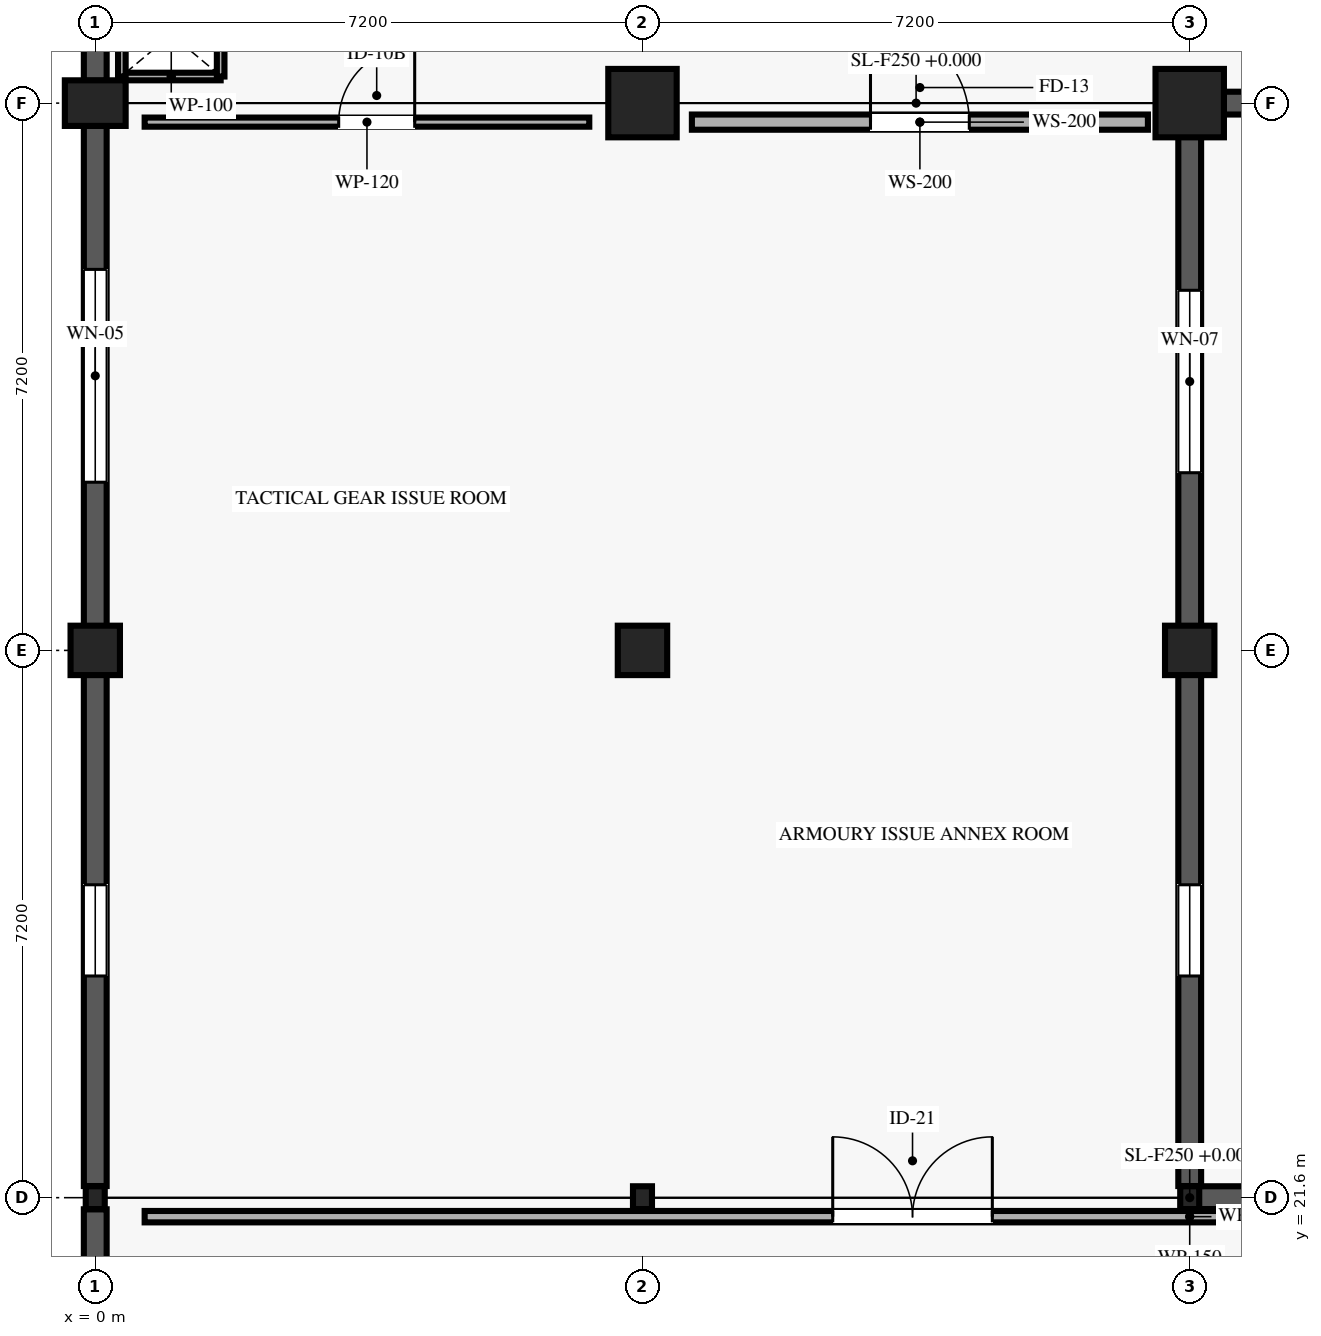
"""IFC4 building model, lengths in metres.
Left out: names, types, materials, properties, quantities, classifications, styles, units other than length and angle.
Written with IfcOpenShell. Run it as: python <this file> out.ifc"""

import sys

from ifc_helpers import new_model, si_unit, direction, frame, frame_2d, origin, origin_2d, place, context, subcontext, project, spatial, rectangle, i_section, extrude, element, fill, save


model = new_model("IFC4")
c1 = context("Model", 3, precision=1e-05, world=origin(), true_north=direction((0.0, 1.0)))
c2 = subcontext(c1, "Body", "Model", "MODEL_VIEW")
j1 = project(units=[si_unit("LENGTHUNIT", "METRE"), si_unit("PLANEANGLEUNIT", "RADIAN")], contexts=[c1])
p1 = place(None, origin())
s1 = spatial("IfcSite", under=j1, at=p1, CompositionType="ELEMENT")
p2 = place(p1, origin())
s2 = spatial("IfcBuilding", under=s1, at=p2, CompositionType="ELEMENT")
p3 = place(p2, origin())
s3 = spatial("IfcBuildingStorey", under=s2, at=p3, CompositionType="ELEMENT", Elevation=0.0)
p4 = place(p3, frame((0.0, 21.6, 0.0), z_axis=(0.0, 0.0, 1.0), x_axis=(1.0, 0.0, 0.0)))
e1 = element("IfcColumn", 1, at=p4, inside=s3, PredefinedType="COLUMN", context=c2, shape_type="SweptSolid", body=[
    extrude(i_section(OverallWidth=0.25, OverallDepth=0.3, WebThickness=0.01, FlangeThickness=0.01, at=origin_2d()), origin(), (0.0, 0.0, 1.0), 5.4),
])
p5 = place(p3, frame((0.0, 28.8, 0.0), z_axis=(0.0, 0.0, 1.0), x_axis=(1.0, 0.0, 0.0)))
e2 = element("IfcColumn", 2, at=p5, inside=s3, PredefinedType="COLUMN", context=c2, shape_type="SweptSolid", body=[
    extrude(rectangle(XDim=0.65, YDim=0.65, at=origin_2d()), origin(), (0.0, 0.0, 1.0), 5.4),
])
p6 = place(p3, frame((0.0, 36.0, 0.0), z_axis=(0.0, 0.0, 1.0), x_axis=(0.0, 1.0, 0.0)))
e3 = element("IfcColumn", 3, at=p6, inside=s3, PredefinedType="COLUMN", context=c2, shape_type="SweptSolid", body=[
    extrude(rectangle(XDim=0.6, YDim=0.8, at=origin_2d()), origin(), (0.0, 0.0, 1.0), 5.4),
])
p7 = place(p3, frame((7.2, 21.6, 0.0), z_axis=(0.0, 0.0, 1.0), x_axis=(1.0, 0.0, 0.0)))
e4 = element("IfcColumn", 4, at=p7, inside=s3, PredefinedType="COLUMN", context=c2, shape_type="SweptSolid", body=[
    extrude(i_section(OverallWidth=0.25, OverallDepth=0.3, WebThickness=0.01, FlangeThickness=0.01, at=origin_2d()), origin(), (0.0, 0.0, 1.0), 5.4),
])
p8 = place(p3, frame((7.2, 28.8, 0.0), z_axis=(0.0, 0.0, 1.0), x_axis=(1.0, 0.0, 0.0)))
e5 = element("IfcColumn", 5, at=p8, inside=s3, PredefinedType="COLUMN", context=c2, shape_type="SweptSolid", body=[
    extrude(rectangle(XDim=0.65, YDim=0.65, at=origin_2d()), origin(), (0.0, 0.0, 1.0), 5.4),
])
p9 = place(p3, frame((7.2, 36.0, 0.0), z_axis=(0.0, 0.0, 1.0), x_axis=(1.0, 0.0, 0.0)))
e6 = element("IfcColumn", 6, at=p9, inside=s3, PredefinedType="COLUMN", context=c2, shape_type="SweptSolid", body=[
    extrude(rectangle(XDim=0.9, YDim=0.9, at=origin_2d()), origin(), (0.0, 0.0, 1.0), 5.4),
])
p10 = place(p3, frame((14.4, 21.6, 0.0), z_axis=(0.0, 0.0, 1.0), x_axis=(1.0, 0.0, 0.0)))
e7 = element("IfcColumn", 7, at=p10, inside=s3, PredefinedType="COLUMN", context=c2, shape_type="SweptSolid", body=[
    extrude(i_section(OverallWidth=0.25, OverallDepth=0.3, WebThickness=0.01, FlangeThickness=0.01, at=origin_2d()), origin(), (0.0, 0.0, 1.0), 5.4),
])
p11 = place(p3, frame((14.4, 28.8, 0.0), z_axis=(0.0, 0.0, 1.0), x_axis=(1.0, 0.0, 0.0)))
e8 = element("IfcColumn", 8, at=p11, inside=s3, PredefinedType="COLUMN", context=c2, shape_type="SweptSolid", body=[
    extrude(rectangle(XDim=0.65, YDim=0.65, at=origin_2d()), origin(), (0.0, 0.0, 1.0), 5.4),
])
p12 = place(p3, frame((14.4, 36.0, 0.0), z_axis=(0.0, 0.0, 1.0), x_axis=(1.0, 0.0, 0.0)))
e9 = element("IfcColumn", 9, at=p12, inside=s3, PredefinedType="COLUMN", context=c2, shape_type="SweptSolid", body=[
    extrude(rectangle(XDim=0.9, YDim=0.9, at=origin_2d()), origin(), (0.0, 0.0, 1.0), 5.4),
])
p13 = place(p3, frame((14.41, 21.6, 0.0), z_axis=(0.0, 0.0, 1.0), x_axis=(1.0, 0.0, 0.0)))
e10 = element("IfcWall", 10, at=p13, inside=s3, PredefinedType="SOLIDWALL", context=c2, shape_type="SweptSolid", body=[
    extrude(rectangle(XDim=7.18, YDim=0.3, at=frame_2d((3.59, 0.0))), origin(), (0.0, 0.0, 1.0), 5.16),
])
p14 = place(p13, frame((2.99, 0.0, 1.85)))
e11 = element("IfcOpeningElement", 11, at=p14, cuts=e10, PredefinedType="OPENING", context=c2, shape_type="SweptSolid", body=[
    extrude(rectangle(XDim=1.2, YDim=0.65, at=frame_2d((0.6, 0.325))), frame((0.0, 0.16, 0.0), z_axis=(0.0, -1.0, 0.0), x_axis=(1.0, 0.0, 0.0)), (0.0, 0.0, 1.0), 0.32),
])
p15 = place(p3, frame((14.845, 36.0, 0.0), z_axis=(0.0, 0.0, 1.0), x_axis=(1.0, 0.0, 0.0)))
e12 = element("IfcWall", 12, at=p15, inside=s3, PredefinedType="SOLIDWALL", context=c2, shape_type="SweptSolid", body=[
    extrude(rectangle(XDim=6.31, YDim=0.3, at=frame_2d((3.155, 0.0))), origin(), (0.0, 0.0, 1.0), 5.16),
])
p16 = place(p15, frame((2.055, 0.0, 0.85)))
e13 = element("IfcOpeningElement", 13, at=p16, cuts=e12, PredefinedType="OPENING", context=c2, shape_type="SweptSolid", body=[
    extrude(rectangle(XDim=2.2, YDim=1.7, at=frame_2d((1.1, 0.85))), frame((0.0, 0.16, 0.0), z_axis=(0.0, -1.0, 0.0), x_axis=(1.0, 0.0, 0.0)), (0.0, 0.0, 1.0), 0.32),
])
p17 = place(p3, frame((0.0, 14.553, 0.0), z_axis=(0.0, 0.0, 1.0), x_axis=(0.0, 1.0, 0.0)))
e14 = element("IfcWall", 14, at=p17, inside=s3, PredefinedType="SOLIDWALL", context=c2, shape_type="SweptSolid", body=[
    extrude(rectangle(XDim=6.894, YDim=0.3, at=frame_2d((3.447, 0.0))), origin(), (0.0, 0.0, 1.0), 5.16),
])
p18 = place(p17, frame((1.847, 0.0, 0.85)))
e15 = element("IfcOpeningElement", 15, at=p18, cuts=e14, PredefinedType="OPENING", context=c2, shape_type="SweptSolid", body=[
    extrude(rectangle(XDim=3.2, YDim=1.95, at=frame_2d((1.6, 0.975))), frame((0.0, 0.16, 0.0), z_axis=(0.0, -1.0, 0.0), x_axis=(1.0, 0.0, 0.0)), (0.0, 0.0, 1.0), 0.32),
])
p19 = place(p3, frame((0.0, 21.753, 0.0), z_axis=(0.0, 0.0, 1.0), x_axis=(0.0, 1.0, 0.0)))
e16 = element("IfcWall", 16, at=p19, inside=s3, PredefinedType="SOLIDWALL", context=c2, shape_type="SweptSolid", body=[
    extrude(rectangle(XDim=6.727, YDim=0.3, at=frame_2d((3.364, 0.0))), origin(), (0.0, 0.0, 1.0), 5.16),
])
p20 = place(p19, frame((2.763, 0.0, 1.85)))
e17 = element("IfcOpeningElement", 17, at=p20, cuts=e16, PredefinedType="OPENING", context=c2, shape_type="SweptSolid", body=[
    extrude(rectangle(XDim=1.2, YDim=0.65, at=frame_2d((0.6, 0.325))), frame((0.0, 0.16, 0.0), z_axis=(0.0, -1.0, 0.0), x_axis=(1.0, 0.0, 0.0)), (0.0, 0.0, 1.0), 0.32),
])
p21 = place(p3, frame((0.0, 29.12, 0.0), z_axis=(0.0, 0.0, 1.0), x_axis=(0.0, 1.0, 0.0)))
e18 = element("IfcWall", 18, at=p21, inside=s3, PredefinedType="SOLIDWALL", context=c2, shape_type="SweptSolid", body=[
    extrude(rectangle(XDim=6.585, YDim=0.3, at=frame_2d((3.292, 0.0))), origin(), (0.0, 0.0, 1.0), 5.16),
])
p22 = place(p21, frame((1.893, 0.0, 0.85)))
e19 = element("IfcOpeningElement", 19, at=p22, cuts=e18, PredefinedType="OPENING", context=c2, shape_type="SweptSolid", body=[
    extrude(rectangle(XDim=2.8, YDim=1.85, at=frame_2d((1.4, 0.925))), frame((0.0, 0.16, 0.0), z_axis=(0.0, -1.0, 0.0), x_axis=(1.0, 0.0, 0.0)), (0.0, 0.0, 1.0), 0.32),
])
p23 = place(p3, frame((0.0, 36.295, 0.0), z_axis=(0.0, 0.0, 1.0), x_axis=(0.0, 1.0, 0.0)))
e20 = element("IfcWall", 20, at=p23, inside=s3, PredefinedType="SOLIDWALL", context=c2, shape_type="SweptSolid", body=[
    extrude(rectangle(XDim=3.085, YDim=0.3, at=frame_2d((1.542, 0.0))), origin(), (0.0, 0.0, 1.0), 5.16),
])
p24 = place(p23, frame((0.843, 0.0, 0.85)))
e21 = element("IfcOpeningElement", 21, at=p24, cuts=e20, PredefinedType="OPENING", context=c2, shape_type="SweptSolid", body=[
    extrude(rectangle(XDim=1.4, YDim=1.6, at=frame_2d((0.7, 0.8))), frame((0.0, 0.16, 0.0), z_axis=(0.0, -1.0, 0.0), x_axis=(1.0, 0.0, 0.0)), (0.0, 0.0, 1.0), 0.32),
])
p25 = place(p3, frame((14.4, 21.753, 0.0), z_axis=(0.0, 0.0, 1.0), x_axis=(0.0, 1.0, 0.0)))
e22 = element("IfcWall", 22, at=p25, inside=s3, PredefinedType="SOLIDWALL", context=c2, shape_type="SweptSolid", body=[
    extrude(rectangle(XDim=6.727, YDim=0.3, at=frame_2d((3.364, 0.0))), origin(), (0.0, 0.0, 1.0), 5.16),
])
p26 = place(p25, frame((2.763, 0.0, 1.85)))
e23 = element("IfcOpeningElement", 23, at=p26, cuts=e22, PredefinedType="OPENING", context=c2, shape_type="SweptSolid", body=[
    extrude(rectangle(XDim=1.2, YDim=0.65, at=frame_2d((0.6, 0.325))), frame((0.0, 0.16, 0.0), z_axis=(0.0, -1.0, 0.0), x_axis=(1.0, 0.0, 0.0)), (0.0, 0.0, 1.0), 0.32),
])
p27 = place(p3, frame((14.4, 29.12, 0.0), z_axis=(0.0, 0.0, 1.0), x_axis=(0.0, 1.0, 0.0)))
e24 = element("IfcWall", 24, at=p27, inside=s3, PredefinedType="SOLIDWALL", context=c2, shape_type="SweptSolid", body=[
    extrude(rectangle(XDim=6.435, YDim=0.3, at=frame_2d((3.217, 0.0))), origin(), (0.0, 0.0, 1.0), 5.16),
])
p28 = place(p27, frame((2.018, 0.0, 0.85)))
e25 = element("IfcOpeningElement", 25, at=p28, cuts=e24, PredefinedType="OPENING", context=c2, shape_type="SweptSolid", body=[
    extrude(rectangle(XDim=2.4, YDim=1.75, at=frame_2d((1.2, 0.875))), frame((0.0, 0.16, 0.0), z_axis=(0.0, -1.0, 0.0), x_axis=(1.0, 0.0, 0.0)), (0.0, 0.0, 1.0), 0.32),
])
p29 = place(p3, frame((0.35, 36.35, 0.0), z_axis=(0.0, 0.0, 1.0), x_axis=(1.0, 0.0, 0.0)))
e26 = element("IfcWall", 26, at=p29, inside=s3, PredefinedType="PARTITIONING", context=c2, shape_type="SweptSolid", body=[
    extrude(rectangle(XDim=1.3, YDim=0.1, at=frame_2d((0.65, 0.0))), origin(), (0.0, 0.0, 1.0), 4.5),
])
p30 = place(p3, frame((0.35, 36.35, 0.0), z_axis=(0.0, 0.0, 1.0), x_axis=(0.0, 1.0, 0.0)))
e27 = element("IfcWall", 27, at=p30, inside=s3, PredefinedType="PARTITIONING", context=c2, shape_type="SweptSolid", body=[
    extrude(rectangle(XDim=1.1, YDim=0.1, at=frame_2d((0.55, 0.0))), origin(), (0.0, 0.0, 1.0), 4.45),
])
p31 = place(p3, frame((1.65, 36.35, 0.0), z_axis=(0.0, 0.0, 1.0), x_axis=(0.0, 1.0, 0.0)))
e28 = element("IfcWall", 28, at=p31, inside=s3, PredefinedType="PARTITIONING", context=c2, shape_type="SweptSolid", body=[
    extrude(rectangle(XDim=1.1, YDim=0.1, at=frame_2d((0.55, 0.0))), origin(), (0.0, 0.0, 1.0), 5.16),
])
p32 = place(p3, frame((0.65, 21.35, 0.0), z_axis=(0.0, 0.0, 1.0), x_axis=(1.0, 0.0, 0.0)))
e29 = element("IfcWall", 29, at=p32, inside=s3, PredefinedType="PARTITIONING", context=c2, shape_type="SweptSolid", body=[
    extrude(rectangle(XDim=27.5, YDim=0.15, at=frame_2d((13.75, 0.0))), origin(), (0.0, 0.0, 1.0), 4.45),
])
p33 = place(p32, frame((9.053, 0.0, 0.0)))
e30 = element("IfcOpeningElement", 30, at=p33, cuts=e29, PredefinedType="OPENING", context=c2, shape_type="SweptSolid", body=[
    extrude(rectangle(XDim=2.1, YDim=2.4, at=frame_2d((1.05, 1.2))), frame((0.0, 0.085, 0.0), z_axis=(0.0, -1.0, 0.0), x_axis=(1.0, 0.0, 0.0)), (0.0, 0.0, 1.0), 0.17),
])
p34 = place(p3, frame((0.65, 35.75, 0.0), z_axis=(0.0, 0.0, 1.0), x_axis=(1.0, 0.0, 0.0)))
e31 = element("IfcWall", 31, at=p34, inside=s3, PredefinedType="PARTITIONING", context=c2, shape_type="SweptSolid", body=[
    extrude(rectangle(XDim=5.85, YDim=0.12, at=frame_2d((2.925, 0.0))), origin(), (0.0, 0.0, 1.0), 4.5),
])
p35 = place(p34, frame((2.553, 0.0, 0.0)))
e32 = element("IfcOpeningElement", 32, at=p35, cuts=e31, PredefinedType="OPENING", context=c2, shape_type="SweptSolid", body=[
    extrude(rectangle(XDim=1.0, YDim=2.1, at=frame_2d((0.5, 1.05))), frame((0.0, 0.07, 0.0), z_axis=(0.0, -1.0, 0.0), x_axis=(1.0, 0.0, 0.0)), (0.0, 0.0, 1.0), 0.14),
])
p36 = place(p3, frame((7.85, 35.75, 0.0), z_axis=(0.0, 0.0, 1.0), x_axis=(1.0, 0.0, 0.0)))
e33 = element("IfcWall", 33, at=p36, inside=s3, PredefinedType="SOLIDWALL", context=c2, shape_type="SweptSolid", body=[
    extrude(rectangle(XDim=6.0, YDim=0.2, at=frame_2d((3.0, 0.0))), origin(), (0.0, 0.0, 1.0), 4.5),
])
p37 = place(p36, frame((2.35, 0.0, 0.0)))
e34 = element("IfcOpeningElement", 34, at=p37, cuts=e33, PredefinedType="OPENING", context=c2, shape_type="SweptSolid", body=[
    extrude(rectangle(XDim=1.3, YDim=2.2, at=frame_2d((0.65, 1.1))), frame((0.0, 0.11, 0.0), z_axis=(0.0, -1.0, 0.0), x_axis=(1.0, 0.0, 0.0)), (0.0, 0.0, 1.0), 0.22),
])
p38 = place(p20, origin())
e35 = element("IfcWindow", 35, at=p38, inside=s3, PartitioningType="SINGLE_PANEL", PredefinedType="WINDOW", context=c2, shape_type="SweptSolid", body=[
    extrude(rectangle(XDim=1.2, YDim=0.65, at=frame_2d((0.6, 0.325))), frame((0.0, 0.03, 0.0), z_axis=(0.0, -1.0, 0.0), x_axis=(1.0, 0.0, 0.0)), (0.0, 0.0, 1.0), 0.06),
])
fill(e17, e35)
p39 = place(p22, origin())
e36 = element("IfcWindow", 36, at=p39, inside=s3, PartitioningType="SINGLE_PANEL", PredefinedType="WINDOW", context=c2, shape_type="SweptSolid", body=[
    extrude(rectangle(XDim=2.8, YDim=1.85, at=frame_2d((1.4, 0.925))), frame((0.0, 0.03, 0.0), z_axis=(0.0, -1.0, 0.0), x_axis=(1.0, 0.0, 0.0)), (0.0, 0.0, 1.0), 0.06),
])
fill(e19, e36)
p40 = place(p26, origin())
e37 = element("IfcWindow", 37, at=p40, inside=s3, PartitioningType="SINGLE_PANEL", PredefinedType="WINDOW", context=c2, shape_type="SweptSolid", body=[
    extrude(rectangle(XDim=1.2, YDim=0.65, at=frame_2d((0.6, 0.325))), frame((0.0, 0.03, 0.0), z_axis=(0.0, -1.0, 0.0), x_axis=(1.0, 0.0, 0.0)), (0.0, 0.0, 1.0), 0.06),
])
fill(e23, e37)
p41 = place(p28, origin())
e38 = element("IfcWindow", 38, at=p41, inside=s3, PartitioningType="SINGLE_PANEL", PredefinedType="WINDOW", context=c2, shape_type="SweptSolid", body=[
    extrude(rectangle(XDim=2.4, YDim=1.75, at=frame_2d((1.2, 0.875))), frame((0.0, 0.03, 0.0), z_axis=(0.0, -1.0, 0.0), x_axis=(1.0, 0.0, 0.0)), (0.0, 0.0, 1.0), 0.06),
])
fill(e25, e38)
p42 = place(p33, origin())
e39 = element("IfcDoor", 39, at=p42, inside=s3, OperationType="DOUBLE_DOOR_SINGLE_SWING", PredefinedType="DOOR", context=c2, shape_type="SweptSolid", body=[
    extrude(rectangle(XDim=2.1, YDim=2.4, at=frame_2d((1.05, 1.2))), frame((0.0, 0.025, 0.0), z_axis=(0.0, -1.0, 0.0), x_axis=(1.0, 0.0, 0.0)), (0.0, 0.0, 1.0), 0.05),
])
fill(e30, e39)
p43 = place(p35, origin())
e40 = element("IfcDoor", 40, at=p43, inside=s3, OperationType="SINGLE_SWING_RIGHT", PredefinedType="DOOR", context=c2, shape_type="SweptSolid", body=[
    extrude(rectangle(XDim=1.0, YDim=2.1, at=frame_2d((0.5, 1.05))), frame((0.0, 0.025, 0.0), z_axis=(0.0, -1.0, 0.0), x_axis=(1.0, 0.0, 0.0)), (0.0, 0.0, 1.0), 0.05),
])
fill(e32, e40)
p44 = place(p37, origin())
e41 = element("IfcDoor", 41, at=p44, inside=s3, OperationType="SINGLE_SWING_LEFT", PredefinedType="DOOR", context=c2, shape_type="SweptSolid", body=[
    extrude(rectangle(XDim=1.3, YDim=2.2, at=frame_2d((0.65, 1.1))), frame((0.0, 0.025, 0.0), z_axis=(0.0, -1.0, 0.0), x_axis=(1.0, 0.0, 0.0)), (0.0, 0.0, 1.0), 0.05),
])
fill(e34, e41)
save(model, sys.argv[1])
